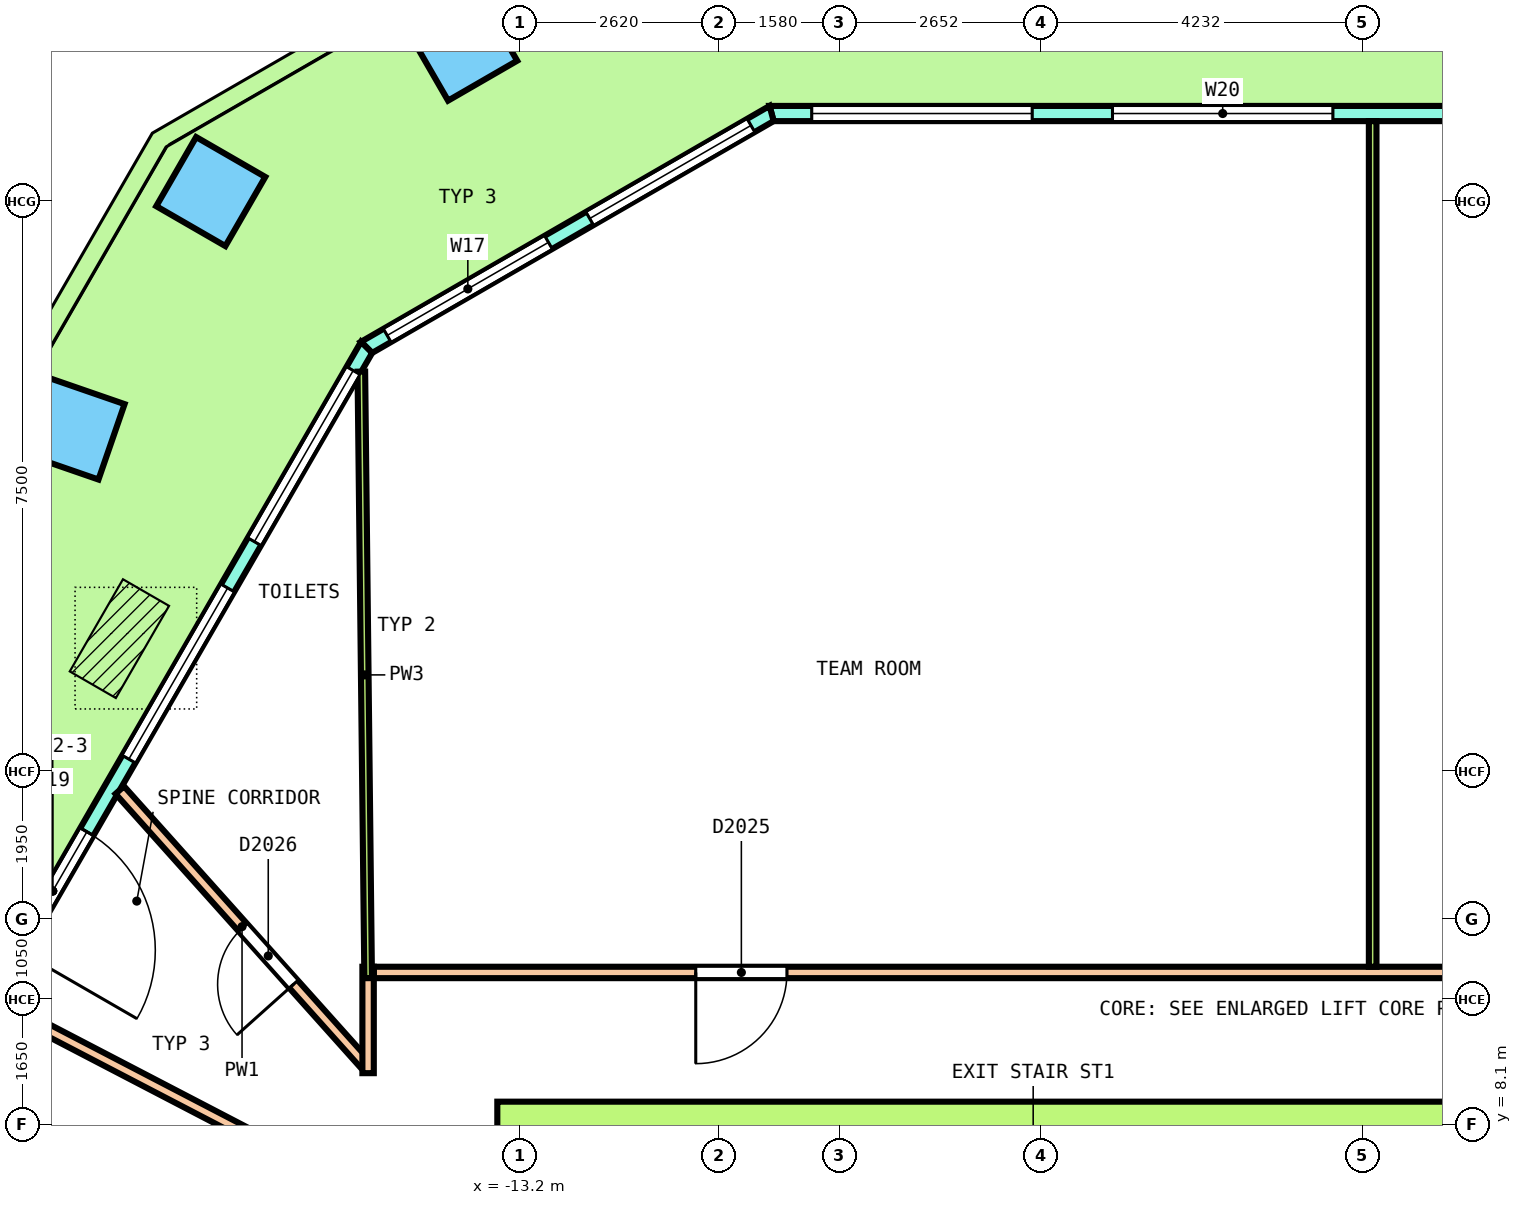
"""IFC4 building model, lengths in metres.
Left out: names, types, materials, properties, quantities, classifications, styles, units other than length and angle.
Written with IfcOpenShell. Run it as: python <this file> out.ifc"""

import sys

from ifc_helpers import new_model, si_unit, direction, frame, frame_2d, origin, origin_2d, place, context, subcontext, project, spatial, polyline, rectangle, outline, extrude, element, fill, save


model = new_model("IFC4")
c1 = context("Model", 3, precision=1e-05, world=origin(), true_north=direction((0.0, 1.0)))
c2 = subcontext(c1, "Body", "Model", "MODEL_VIEW")
j1 = project(units=[si_unit("LENGTHUNIT", "METRE"), si_unit("PLANEANGLEUNIT", "RADIAN")], contexts=[c1])
p1 = place(None, origin())
s1 = spatial("IfcSite", under=j1, at=p1, CompositionType="ELEMENT")
p2 = place(p1, origin())
s2 = spatial("IfcBuilding", under=s1, at=p2, CompositionType="ELEMENT")
p3 = place(p2, frame((0.0, 0.0, 241.4)))
s3 = spatial("IfcBuildingStorey", under=s2, at=p3, CompositionType="ELEMENT", Elevation=241.4)
for number, where, z_axis, x_axis in (
    (1, (-13.956, 22.287, 0.0), (-0.036, 0.0, 0.999), (-0.865, -0.5, -0.031)),
    (2, (-17.27, 20.373, 0.0), (-0.036, 0.0, 0.999), (-0.499, -0.866, -0.018)),
):
    element("IfcColumn", number, at=place(p3, frame(where, z_axis=z_axis, x_axis=x_axis)), inside=s3, PredefinedType="COLUMN", context=c2, shape_type="SweptSolid", body=[
        extrude(rectangle(XDim=1.05, YDim=1.05, at=origin_2d()), origin(), (0.0, 0.0, 1.0), 3.653),
    ])
p4 = place(p3, frame((-19.072, 17.252, 0.0), z_axis=(-0.032688717128, 0.006283720675, 0.99944582776), x_axis=(-0.499189907536, -0.866424302438, -0.010879538516)))
e3 = element("IfcColumn", 3, at=p4, inside=s3, PredefinedType="COLUMN", context=c2, shape_type="SweptSolid", body=[
    extrude(rectangle(XDim=1.05, YDim=1.05, at=origin_2d()), origin(), (0.0, 0.0, 1.0), 3.652),
])
p5 = place(p3, frame((9.892, 21.4, 0.0), z_axis=(0.0, 0.0, 1.0), x_axis=(-1.0, 0.0, 0.0)))
e4 = element("IfcWall", 4, at=p5, inside=s3, PredefinedType="SOLIDWALL", context=c2, shape_type="SweptSolid", body=[
    extrude(outline(polyline([(-0.027, -0.1), (1.017, -0.1), (2.061, -0.1), (3.105, -0.1), (4.149, -0.1), (5.193, -0.1), (6.238, -0.1), (7.281, -0.1), (8.325, -0.1), (9.37, -0.1), (10.414, -0.1), (11.458, -0.1), (12.502, -0.1), (13.546, -0.1), (14.59, -0.1), (15.634, -0.1), (16.678, -0.1), (17.722, -0.1), (18.766, -0.1), (19.81, -0.1), (19.756, 0.1), (18.718, 0.1), (17.679, 0.1), (16.641, 0.1), (15.603, 0.1), (14.564, 0.1), (13.526, 0.1), (12.488, 0.1), (11.449, 0.1), (10.411, 0.1), (9.372, 0.1), (8.334, 0.1), (7.296, 0.1), (6.257, 0.1), (5.219, 0.1), (4.18, 0.1), (3.142, 0.1), (2.104, 0.1), (1.065, 0.1), (0.027, 0.1), (-0.027, -0.1)])), origin(), (0.0, 0.0, 1.0), 3.7),
])
p6 = place(p5, frame((0.528, 0.0, 0.1)))
e5 = element("IfcOpeningElement", 5, at=p6, cuts=e4, PredefinedType="OPENING", context=c2, shape_type="SweptSolid", body=[
    extrude(rectangle(XDim=2.9, YDim=2.65, at=frame_2d((1.45, 1.325))), frame((0.0, 0.11, 0.0), z_axis=(0.0, -1.0, 0.0), x_axis=(1.0, 0.0, 0.0)), (0.0, 0.0, 1.0), 0.22),
])
p7 = place(p5, frame((4.485, 0.0, 0.1)))
e6 = element("IfcOpeningElement", 6, at=p7, cuts=e4, PredefinedType="OPENING", context=c2, shape_type="SweptSolid", body=[
    extrude(rectangle(XDim=2.9, YDim=2.65, at=frame_2d((1.45, 1.325))), frame((0.0, 0.11, 0.0), z_axis=(0.0, -1.0, 0.0), x_axis=(1.0, 0.0, 0.0)), (0.0, 0.0, 1.0), 0.22),
])
p8 = place(p5, frame((8.991, 0.0, 0.0)))
e7 = element("IfcOpeningElement", 7, at=p8, cuts=e4, PredefinedType="OPENING", context=c2, shape_type="SweptSolid", body=[
    extrude(rectangle(XDim=1.8, YDim=2.4, at=frame_2d((0.9, 1.2))), frame((0.0, 0.11, 0.0), z_axis=(0.0, -1.0, 0.0), x_axis=(1.0, 0.0, 0.0)), (0.0, 0.0, 1.0), 0.22),
])
p9 = place(p5, frame((8.991, 0.0, 2.55)))
e8 = element("IfcOpeningElement", 8, at=p9, cuts=e4, PredefinedType="OPENING", context=c2, shape_type="SweptSolid", body=[
    extrude(rectangle(XDim=1.8, YDim=0.2, at=frame_2d((0.9, 0.1))), frame((0.0, 0.11, 0.0), z_axis=(0.0, -1.0, 0.0), x_axis=(1.0, 0.0, 0.0)), (0.0, 0.0, 1.0), 0.22),
])
p10 = place(p5, frame((12.398, 0.0, 0.1)))
e9 = element("IfcOpeningElement", 9, at=p10, cuts=e4, PredefinedType="OPENING", context=c2, shape_type="SweptSolid", body=[
    extrude(rectangle(XDim=2.9, YDim=2.65, at=frame_2d((1.45, 1.325))), frame((0.0, 0.11, 0.0), z_axis=(0.0, -1.0, 0.0), x_axis=(1.0, 0.0, 0.0)), (0.0, 0.0, 1.0), 0.22),
])
p11 = place(p5, frame((16.355, 0.0, 0.1)))
e10 = element("IfcOpeningElement", 10, at=p11, cuts=e4, PredefinedType="OPENING", context=c2, shape_type="SweptSolid", body=[
    extrude(rectangle(XDim=2.9, YDim=2.65, at=frame_2d((1.45, 1.325))), frame((0.0, 0.11, 0.0), z_axis=(0.0, -1.0, 0.0), x_axis=(1.0, 0.0, 0.0)), (0.0, 0.0, 1.0), 0.22),
])
p12 = place(p3, frame((-9.892, 21.4, 0.0), z_axis=(0.0, 0.0, 1.0), x_axis=(-0.866029647142, -0.499992650217, 0.0)))
e11 = element("IfcWall", 11, at=p12, inside=s3, PredefinedType="SOLIDWALL", context=c2, shape_type="SweptSolid", body=[
    extrude(outline(polyline([(-0.027, -0.1), (1.008, -0.1), (2.042, -0.1), (3.076, -0.1), (4.111, -0.1), (5.145, -0.1), (6.18, -0.1), (6.126, 0.1), (5.109, 0.1), (4.093, 0.1), (3.076, 0.1), (2.06, 0.1), (1.043, 0.1), (0.027, 0.1), (-0.027, -0.1)])), origin(), (0.0, 0.0, 1.0), 3.7),
])
p13 = place(p12, frame((0.313, 0.0, 0.1)))
e12 = element("IfcOpeningElement", 12, at=p13, cuts=e11, PredefinedType="OPENING", context=c2, shape_type="SweptSolid", body=[
    extrude(rectangle(XDim=2.45, YDim=2.65, at=frame_2d((1.225, 1.325))), frame((0.0, 0.11, 0.0), z_axis=(0.0, -1.0, 0.0), x_axis=(1.0, 0.0, 0.0)), (0.0, 0.0, 1.0), 0.22),
])
p14 = place(p12, frame((3.39, 0.0, 0.1)))
e13 = element("IfcOpeningElement", 13, at=p14, cuts=e11, PredefinedType="OPENING", context=c2, shape_type="SweptSolid", body=[
    extrude(rectangle(XDim=2.45, YDim=2.65, at=frame_2d((1.225, 1.325))), frame((0.0, 0.11, 0.0), z_axis=(0.0, -1.0, 0.0), x_axis=(1.0, 0.0, 0.0)), (0.0, 0.0, 1.0), 0.22),
])
p15 = place(p3, frame((-15.22, 18.323, 0.0), z_axis=(0.0, 0.0, 1.0), x_axis=(-0.500000529106, -0.866025098304, 0.0)))
e14 = element("IfcWall", 14, at=p15, inside=s3, PredefinedType="SOLIDWALL", context=c2, shape_type="SweptSolid", body=[
    extrude(outline(polyline([(-0.027, -0.1), (1.009, -0.1), (2.044, -0.1), (3.08, -0.1), (4.116, -0.1), (5.152, -0.1), (6.187, -0.1), (7.223, -0.1), (8.259, -0.1), (9.294, -0.1), (10.33, -0.1), (11.365, -0.1), (12.401, -0.1), (13.437, -0.1), (14.473, -0.1), (15.508, -0.1), (16.544, -0.1), (16.49, 0.1), (15.461, 0.1), (14.432, 0.1), (13.403, 0.1), (12.375, 0.1), (11.345, 0.1), (10.316, 0.1), (9.288, 0.1), (8.259, 0.1), (7.229, 0.1), (6.201, 0.1), (5.172, 0.1), (4.143, 0.1), (3.114, 0.1), (2.085, 0.1), (1.056, 0.1), (0.027, 0.1), (-0.027, -0.1)])), origin(), (0.0, 0.0, 1.0), 3.7),
])
p16 = place(p15, frame((0.352, 0.0, 0.1)))
e15 = element("IfcOpeningElement", 15, at=p16, cuts=e14, PredefinedType="OPENING", context=c2, shape_type="SweptSolid", body=[
    extrude(rectangle(XDim=2.6, YDim=2.65, at=frame_2d((1.3, 1.325))), frame((0.0, 0.11, 0.0), z_axis=(0.0, -1.0, 0.0), x_axis=(1.0, 0.0, 0.0)), (0.0, 0.0, 1.0), 0.22),
])
p17 = place(p15, frame((3.655, 0.0, 0.1)))
e16 = element("IfcOpeningElement", 16, at=p17, cuts=e14, PredefinedType="OPENING", context=c2, shape_type="SweptSolid", body=[
    extrude(rectangle(XDim=2.6, YDim=2.65, at=frame_2d((1.3, 1.325))), frame((0.0, 0.11, 0.0), z_axis=(0.0, -1.0, 0.0), x_axis=(1.0, 0.0, 0.0)), (0.0, 0.0, 1.0), 0.22),
])
p18 = place(p15, frame((7.359, 0.0, 0.0)))
e17 = element("IfcOpeningElement", 17, at=p18, cuts=e14, PredefinedType="OPENING", context=c2, shape_type="SweptSolid", body=[
    extrude(rectangle(XDim=1.8, YDim=2.4, at=frame_2d((0.9, 1.2))), frame((0.0, 0.11, 0.0), z_axis=(0.0, -1.0, 0.0), x_axis=(1.0, 0.0, 0.0)), (0.0, 0.0, 1.0), 0.22),
])
p19 = place(p15, frame((7.359, 0.0, 2.55)))
e18 = element("IfcOpeningElement", 18, at=p19, cuts=e14, PredefinedType="OPENING", context=c2, shape_type="SweptSolid", body=[
    extrude(rectangle(XDim=1.8, YDim=0.2, at=frame_2d((0.9, 0.1))), frame((0.0, 0.11, 0.0), z_axis=(0.0, -1.0, 0.0), x_axis=(1.0, 0.0, 0.0)), (0.0, 0.0, 1.0), 0.22),
])
p20 = place(p15, frame((10.262, 0.0, 0.1)))
e19 = element("IfcOpeningElement", 19, at=p20, cuts=e14, PredefinedType="OPENING", context=c2, shape_type="SweptSolid", body=[
    extrude(rectangle(XDim=2.6, YDim=2.65, at=frame_2d((1.3, 1.325))), frame((0.0, 0.11, 0.0), z_axis=(0.0, -1.0, 0.0), x_axis=(1.0, 0.0, 0.0)), (0.0, 0.0, 1.0), 0.22),
])
p21 = place(p15, frame((13.565, 0.0, 0.1)))
e20 = element("IfcOpeningElement", 20, at=p21, cuts=e14, PredefinedType="OPENING", context=c2, shape_type="SweptSolid", body=[
    extrude(rectangle(XDim=2.6, YDim=2.65, at=frame_2d((1.3, 1.325))), frame((0.0, 0.11, 0.0), z_axis=(0.0, -1.0, 0.0), x_axis=(1.0, 0.0, 0.0)), (0.0, 0.0, 1.0), 0.22),
])
p22 = place(p3, frame((-13.5, 8.1, 0.0), z_axis=(0.0, 0.0, 1.0), x_axis=(1.0, 0.0, 0.0)))
e21 = element("IfcWall", 21, at=p22, inside=s3, PredefinedType="SHEAR", context=c2, shape_type="SweptSolid", body=[
    extrude(rectangle(XDim=27.0, YDim=0.6, at=frame_2d((13.5, 0.0))), origin(), (0.0, 0.0, 1.0), 3.7),
])
p23 = place(p22, frame((14.425, 0.0, 0.0)))
e22 = element("IfcOpeningElement", 22, at=p23, cuts=e21, PredefinedType="OPENING", context=c2, shape_type="SweptSolid", body=[
    extrude(rectangle(XDim=1.4, YDim=2.1, at=frame_2d((0.7, 1.05))), frame((0.0, 0.31, 0.0), z_axis=(0.0, -1.0, 0.0), x_axis=(1.0, 0.0, 0.0)), (0.0, 0.0, 1.0), 0.62),
])
p24 = place(p3, frame((-18.467, 12.5, 0.0), z_axis=(0.0, 0.0, 1.0), x_axis=(0.667001980811, -0.745055942594, 0.0)))
e23 = element("IfcWall", 23, at=p24, inside=s3, PredefinedType="PARTITIONING", context=c2, shape_type="SweptSolid", body=[
    extrude(rectangle(XDim=4.823, YDim=0.15, at=frame_2d((2.412, 0.0))), origin(), (0.0, 0.0, 1.0), 2.8),
])
p25 = place(p24, frame((2.429, 0.0, 0.0)))
e24 = element("IfcOpeningElement", 24, at=p25, cuts=e23, PredefinedType="OPENING", context=c2, shape_type="SweptSolid", body=[
    extrude(rectangle(XDim=1.0, YDim=2.1, at=frame_2d((0.5, 1.05))), frame((0.0, 0.085, 0.0), z_axis=(0.0, -1.0, 0.0), x_axis=(1.0, 0.0, 0.0)), (0.0, 0.0, 1.0), 0.17),
])
p26 = place(p3, frame((-20.087, 9.694, 0.0), z_axis=(0.0, 0.0, 1.0), x_axis=(0.887012228778, -0.461745932303, 0.0)))
e25 = element("IfcWall", 25, at=p26, inside=s3, PredefinedType="PARTITIONING", context=c2, shape_type="SweptSolid", body=[
    extrude(rectangle(XDim=5.434, YDim=0.15, at=frame_2d((2.717, 0.0))), origin(), (0.0, 0.0, 1.0), 2.8),
])
p27 = place(p3, frame((-15.125, 10.1, 0.0), z_axis=(0.0, 0.0, 1.0), x_axis=(1.0, 0.0, 0.0)))
e26 = element("IfcWall", 26, at=p27, inside=s3, PredefinedType="PARTITIONING", context=c2, shape_type="SweptSolid", body=[
    extrude(rectangle(XDim=30.275, YDim=0.15, at=frame_2d((15.137, 0.0))), origin(), (0.0, 0.0, 1.0), 2.8),
])
p28 = place(p27, frame((28.08, 0.0, 0.0)))
e27 = element("IfcOpeningElement", 27, at=p28, cuts=e26, PredefinedType="OPENING", context=c2, shape_type="SweptSolid", body=[
    extrude(rectangle(XDim=1.0, YDim=2.1, at=frame_2d((0.5, 1.05))), frame((0.0, 0.085, 0.0), z_axis=(0.0, -1.0, 0.0), x_axis=(1.0, 0.0, 0.0)), (0.0, 0.0, 1.0), 0.17),
])
p29 = place(p27, frame((21.143, 0.0, 0.0)))
e28 = element("IfcOpeningElement", 28, at=p29, cuts=e26, PredefinedType="OPENING", context=c2, shape_type="SweptSolid", body=[
    extrude(rectangle(XDim=1.0, YDim=2.1, at=frame_2d((0.5, 1.05))), frame((0.0, 0.085, 0.0), z_axis=(0.0, -1.0, 0.0), x_axis=(1.0, 0.0, 0.0)), (0.0, 0.0, 1.0), 0.17),
])
p30 = place(p27, frame((4.236, 0.0, 0.0)))
e29 = element("IfcOpeningElement", 29, at=p30, cuts=e26, PredefinedType="OPENING", context=c2, shape_type="SweptSolid", body=[
    extrude(rectangle(XDim=1.2, YDim=2.1, at=frame_2d((0.6, 1.05))), frame((0.0, 0.085, 0.0), z_axis=(0.0, -1.0, 0.0), x_axis=(1.0, 0.0, 0.0)), (0.0, 0.0, 1.0), 0.17),
])
p31 = place(p3, frame((-15.2, 8.775, 0.0), z_axis=(0.0, 0.0, 1.0), x_axis=(0.0, 1.0, 0.0)))
e30 = element("IfcWall", 30, at=p31, inside=s3, PredefinedType="PARTITIONING", context=c2, shape_type="SweptSolid", body=[
    extrude(rectangle(XDim=1.4, YDim=0.15, at=frame_2d((0.7, 0.0))), origin(), (0.0, 0.0, 1.0), 2.8),
])
p32 = place(p3, frame((-1.984, 10.175, 0.0), z_axis=(0.0, 0.0, 1.0), x_axis=(0.0, 1.0, 0.0)))
e31 = element("IfcWall", 31, at=p32, inside=s3, PredefinedType="PARTITIONING", context=c2, shape_type="SweptSolid", body=[
    extrude(rectangle(XDim=11.125, YDim=0.1, at=frame_2d((5.562, 0.0))), origin(), (0.0, 0.0, 1.0), 2.8),
])
p33 = place(p3, frame((-15.289, 18.004, 0.0), z_axis=(0.0, 0.0, 1.0), x_axis=(0.011228027955, -0.999936963707, 0.0)))
e32 = element("IfcWall", 32, at=p33, inside=s3, PredefinedType="PARTITIONING", context=c2, shape_type="SweptSolid", body=[
    extrude(rectangle(XDim=7.98, YDim=0.1, at=frame_2d((3.99, 0.0))), origin(), (0.0, 0.0, 1.0), 2.8),
])
p34 = place(p10, origin())
e33 = element("IfcWindow", 33, at=p34, inside=s3, PartitioningType="SINGLE_PANEL", PredefinedType="WINDOW", context=c2, shape_type="SweptSolid", body=[
    extrude(rectangle(XDim=2.9, YDim=2.65, at=frame_2d((1.45, 1.325))), frame((0.0, 0.03, 0.0), z_axis=(0.0, -1.0, 0.0), x_axis=(1.0, 0.0, 0.0)), (0.0, 0.0, 1.0), 0.06),
])
fill(e9, e33)
p35 = place(p11, origin())
e34 = element("IfcWindow", 34, at=p35, inside=s3, PartitioningType="SINGLE_PANEL", PredefinedType="WINDOW", context=c2, shape_type="SweptSolid", body=[
    extrude(rectangle(XDim=2.9, YDim=2.65, at=frame_2d((1.45, 1.325))), frame((0.0, 0.03, 0.0), z_axis=(0.0, -1.0, 0.0), x_axis=(1.0, 0.0, 0.0)), (0.0, 0.0, 1.0), 0.06),
])
fill(e10, e34)
p36 = place(p13, origin())
e35 = element("IfcWindow", 35, at=p36, inside=s3, PartitioningType="SINGLE_PANEL", PredefinedType="WINDOW", context=c2, shape_type="SweptSolid", body=[
    extrude(rectangle(XDim=2.45, YDim=2.65, at=frame_2d((1.225, 1.325))), frame((0.0, 0.03, 0.0), z_axis=(0.0, -1.0, 0.0), x_axis=(1.0, 0.0, 0.0)), (0.0, 0.0, 1.0), 0.06),
])
fill(e12, e35)
p37 = place(p14, origin())
e36 = element("IfcWindow", 36, at=p37, inside=s3, PartitioningType="SINGLE_PANEL", PredefinedType="WINDOW", context=c2, shape_type="SweptSolid", body=[
    extrude(rectangle(XDim=2.45, YDim=2.65, at=frame_2d((1.225, 1.325))), frame((0.0, 0.03, 0.0), z_axis=(0.0, -1.0, 0.0), x_axis=(1.0, 0.0, 0.0)), (0.0, 0.0, 1.0), 0.06),
])
fill(e13, e36)
p38 = place(p16, origin())
e37 = element("IfcWindow", 37, at=p38, inside=s3, PartitioningType="SINGLE_PANEL", PredefinedType="WINDOW", context=c2, shape_type="SweptSolid", body=[
    extrude(rectangle(XDim=2.6, YDim=2.65, at=frame_2d((1.3, 1.325))), frame((0.0, 0.03, 0.0), z_axis=(0.0, -1.0, 0.0), x_axis=(1.0, 0.0, 0.0)), (0.0, 0.0, 1.0), 0.06),
])
fill(e15, e37)
p39 = place(p17, origin())
e38 = element("IfcWindow", 38, at=p39, inside=s3, PartitioningType="SINGLE_PANEL", PredefinedType="WINDOW", context=c2, shape_type="SweptSolid", body=[
    extrude(rectangle(XDim=2.6, YDim=2.65, at=frame_2d((1.3, 1.325))), frame((0.0, 0.03, 0.0), z_axis=(0.0, -1.0, 0.0), x_axis=(1.0, 0.0, 0.0)), (0.0, 0.0, 1.0), 0.06),
])
fill(e16, e38)
p40 = place(p18, origin())
e39 = element("IfcDoor", 39, at=p40, inside=s3, OperationType="DOUBLE_DOOR_SINGLE_SWING", PredefinedType="DOOR", context=c2, shape_type="SweptSolid", body=[
    extrude(rectangle(XDim=1.8, YDim=2.4, at=frame_2d((0.9, 1.2))), frame((0.0, 0.025, 0.0), z_axis=(0.0, -1.0, 0.0), x_axis=(1.0, 0.0, 0.0)), (0.0, 0.0, 1.0), 0.05),
])
fill(e17, e39)
p41 = place(p19, origin())
e40 = element("IfcWindow", 40, at=p41, inside=s3, PartitioningType="SINGLE_PANEL", PredefinedType="WINDOW", context=c2, shape_type="SweptSolid", body=[
    extrude(rectangle(XDim=1.8, YDim=0.2, at=frame_2d((0.9, 0.1))), frame((0.0, 0.03, 0.0), z_axis=(0.0, -1.0, 0.0), x_axis=(1.0, 0.0, 0.0)), (0.0, 0.0, 1.0), 0.06),
])
fill(e18, e40)
p42 = place(p30, origin())
e41 = element("IfcDoor", 41, at=p42, inside=s3, OperationType="DOUBLE_DOOR_SINGLE_SWING", PredefinedType="DOOR", context=c2, shape_type="SweptSolid", body=[
    extrude(rectangle(XDim=1.2, YDim=2.1, at=frame_2d((0.6, 1.05))), frame((0.0, 0.025, 0.0), z_axis=(0.0, -1.0, 0.0), x_axis=(1.0, 0.0, 0.0)), (0.0, 0.0, 1.0), 0.05),
])
fill(e29, e41)
p43 = place(p25, origin())
e42 = element("IfcDoor", 42, at=p43, inside=s3, OperationType="SINGLE_SWING_RIGHT", PredefinedType="DOOR", context=c2, shape_type="SweptSolid", body=[
    extrude(rectangle(XDim=1.0, YDim=2.1, at=frame_2d((0.5, 1.05))), frame((0.0, 0.025, 0.0), z_axis=(0.0, -1.0, 0.0), x_axis=(1.0, 0.0, 0.0)), (0.0, 0.0, 1.0), 0.05),
])
fill(e24, e42)
save(model, sys.argv[1])
